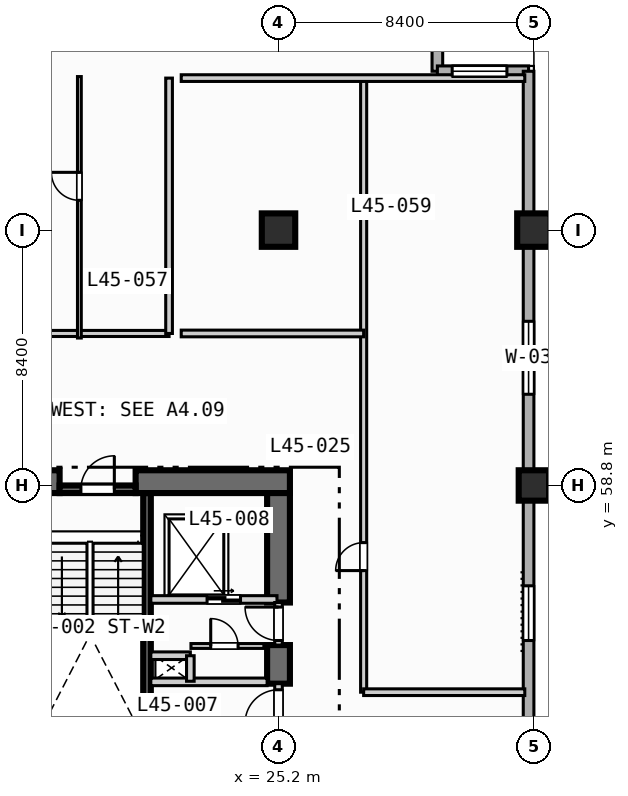
"""IFC4 building model, lengths in metres.
Left out: names, types, materials, properties, quantities, classifications, styles, units other than length and angle.
Written with IfcOpenShell. Run it as: python <this file> out.ifc"""

import sys

from ifc_helpers import new_model, si_unit, direction, frame, frame_2d, origin, origin_2d, place, context, subcontext, project, spatial, rectangle, extrude, element, fill, save


model = new_model("IFC4")
c1 = context("Model", 3, precision=1e-05, world=origin(), true_north=direction((0.0, 1.0)))
c2 = subcontext(c1, "Body", "Model", "MODEL_VIEW")
j1 = project(units=[si_unit("LENGTHUNIT", "METRE"), si_unit("PLANEANGLEUNIT", "RADIAN")], contexts=[c1])
p1 = place(None, origin())
s1 = spatial("IfcSite", under=j1, at=p1, CompositionType="ELEMENT")
p2 = place(p1, origin())
s2 = spatial("IfcBuilding", under=s1, at=p2, CompositionType="ELEMENT")
p3 = place(p2, frame((0.0, 0.0, 186.5)))
s3 = spatial("IfcBuildingStorey", under=s2, at=p3, CompositionType="ELEMENT", Elevation=186.5)
p4 = place(p3, frame((20.875, 50.5, 0.0), z_axis=(0.0, 0.0, 1.0), x_axis=(0.0, 1.0, 0.0)))
e1 = element("IfcWall", 1, at=p4, inside=s3, PredefinedType="SOLIDWALL", context=c2, shape_type="SweptSolid", body=[
    extrude(rectangle(XDim=8.05, YDim=0.25, at=frame_2d((4.025, 0.0))), origin(), (0.0, 0.0, 1.0), 3.47),
])
p5 = place(p3, frame((16.5, 58.925, 0.0), z_axis=(0.0, 0.0, 1.0), x_axis=(1.0, 0.0, 0.0)))
e2 = element("IfcWall", 2, at=p5, inside=s3, PredefinedType="SHEAR", context=c2, shape_type="SweptSolid", body=[
    extrude(rectangle(XDim=1.5, YDim=0.75, at=frame_2d((0.75, 0.0))), origin(), (0.0, 0.0, 1.0), 3.47),
])
p6 = place(p3, frame((20.5, 58.925, 0.0), z_axis=(0.0, 0.0, 1.0), x_axis=(1.0, 0.0, 0.0)))
e3 = element("IfcWall", 3, at=p6, inside=s3, PredefinedType="SHEAR", context=c2, shape_type="SweptSolid", body=[
    extrude(rectangle(XDim=5.075, YDim=0.75, at=frame_2d((2.538, 0.0))), origin(), (0.0, 0.0, 1.0), 3.47),
])
p7 = place(p3, frame((25.2, 52.28, 0.0), z_axis=(0.0, 0.0, 1.0), x_axis=(0.0, 1.0, 0.0)))
e4 = element("IfcWall", 4, at=p7, inside=s3, PredefinedType="SHEAR", context=c2, shape_type="SweptSolid", body=[
    extrude(rectangle(XDim=1.27, YDim=0.75, at=frame_2d((0.635, 0.0))), origin(), (0.0, 0.0, 1.0), 3.47),
])
p8 = place(p3, frame((25.2, 54.95, 0.0), z_axis=(0.0, 0.0, 1.0), x_axis=(0.0, 1.0, 0.0)))
e5 = element("IfcWall", 5, at=p8, inside=s3, PredefinedType="SHEAR", context=c2, shape_type="SweptSolid", body=[
    extrude(rectangle(XDim=3.6, YDim=0.75, at=frame_2d((1.8, 0.0))), origin(), (0.0, 0.0, 1.0), 3.47),
])
p9 = place(p3, frame((25.2, 67.2, 0.0), z_axis=(0.0, 0.0, 1.0), x_axis=(1.0, 0.0, 0.0)))
e6 = element("IfcColumn", 6, at=p9, inside=s3, PredefinedType="COLUMN", context=c2, shape_type="SweptSolid", body=[
    extrude(rectangle(XDim=1.1, YDim=1.1, at=origin_2d()), origin(), (0.0, 0.0, 1.0), 3.7),
])
p10 = place(p3, frame((33.6, 58.8, 0.0), z_axis=(0.0, 0.0, 1.0), x_axis=(1.0, 0.0, 0.0)))
e7 = element("IfcColumn", 7, at=p10, inside=s3, PredefinedType="COLUMN", context=c2, shape_type="SweptSolid", body=[
    extrude(rectangle(XDim=1.0, YDim=1.0, at=origin_2d()), origin(), (0.0, 0.0, 1.0), 3.7),
])
p11 = place(p3, frame((33.6, 67.2, 0.0), z_axis=(0.0, 0.0, 1.0), x_axis=(1.0, 0.0, 0.0)))
e8 = element("IfcColumn", 8, at=p11, inside=s3, PredefinedType="COLUMN", context=c2, shape_type="SweptSolid", body=[
    extrude(rectangle(XDim=1.1, YDim=1.1, at=origin_2d()), origin(), (0.0, 0.0, 1.0), 3.7),
])
p12 = place(p3, frame((30.425, 75.425, 0.0), z_axis=(0.0, 0.0, 1.0), x_axis=(0.0, -1.0, 0.0)))
e9 = element("IfcWall", 9, at=p12, inside=s3, PredefinedType="STANDARD", context=c2, shape_type="SweptSolid", body=[
    extrude(rectangle(XDim=3.0, YDim=0.35, at=frame_2d((1.5, 0.0))), origin(), (0.0, 0.0, 1.0), 3.47),
])
p13 = place(p3, frame((30.425, 72.425, 0.0), z_axis=(0.0, 0.0, 1.0), x_axis=(1.0, 0.0, 0.0)))
e10 = element("IfcWall", 10, at=p13, inside=s3, PredefinedType="STANDARD", context=c2, shape_type="SweptSolid", body=[
    extrude(rectangle(XDim=3.0, YDim=0.35, at=frame_2d((1.5, 0.0))), origin(), (0.0, 0.0, 1.0), 3.47),
])
p14 = place(p13, frame((0.488, 0.0, 0.85)))
e11 = element("IfcOpeningElement", 11, at=p14, cuts=e10, PredefinedType="OPENING", context=c2, shape_type="SweptSolid", body=[
    extrude(rectangle(XDim=1.8, YDim=1.8, at=frame_2d((0.9, 0.9))), frame((0.0, 0.185, 0.0), z_axis=(0.0, -1.0, 0.0), x_axis=(1.0, 0.0, 0.0)), (0.0, 0.0, 1.0), 0.37),
])
p15 = place(p3, frame((33.425, 72.425, 0.0), z_axis=(0.0, 0.0, 1.0), x_axis=(0.0, -1.0, 0.0)))
e12 = element("IfcWall", 12, at=p15, inside=s3, PredefinedType="STANDARD", context=c2, shape_type="SweptSolid", body=[
    extrude(rectangle(XDim=39.0, YDim=0.35, at=frame_2d((19.5, 0.0))), origin(), (0.0, 0.0, 1.0), 3.47),
])
p16 = place(p15, frame((33.725, 0.0, 0.85)))
e13 = element("IfcOpeningElement", 13, at=p16, cuts=e12, PredefinedType="OPENING", context=c2, shape_type="SweptSolid", body=[
    extrude(rectangle(XDim=1.8, YDim=1.8, at=frame_2d((0.9, 0.9))), frame((0.0, 0.185, 0.0), z_axis=(0.0, -1.0, 0.0), x_axis=(1.0, 0.0, 0.0)), (0.0, 0.0, 1.0), 0.37),
])
p17 = place(p15, frame((16.925, 0.0, 0.85)))
e14 = element("IfcOpeningElement", 14, at=p17, cuts=e12, PredefinedType="OPENING", context=c2, shape_type="SweptSolid", body=[
    extrude(rectangle(XDim=1.8, YDim=1.8, at=frame_2d((0.9, 0.9))), frame((0.0, 0.185, 0.0), z_axis=(0.0, -1.0, 0.0), x_axis=(1.0, 0.0, 0.0)), (0.0, 0.0, 1.0), 0.37),
])
p18 = place(p15, frame((8.225, 0.0, 0.85)))
e15 = element("IfcOpeningElement", 15, at=p18, cuts=e12, PredefinedType="OPENING", context=c2, shape_type="SweptSolid", body=[
    extrude(rectangle(XDim=2.4, YDim=1.95, at=frame_2d((1.2, 0.975))), frame((0.0, 0.185, 0.0), z_axis=(0.0, -1.0, 0.0), x_axis=(1.0, 0.0, 0.0)), (0.0, 0.0, 1.0), 0.37),
])
p19 = place(p3, frame((18.0, 58.675, 0.0), z_axis=(0.0, 0.0, 1.0), x_axis=(1.0, 0.0, 0.0)))
e16 = element("IfcWall", 16, at=p19, inside=s3, PredefinedType="SOLIDWALL", context=c2, shape_type="SweptSolid", body=[
    extrude(rectangle(XDim=2.5, YDim=0.25, at=frame_2d((1.25, 0.0))), origin(), (0.0, 0.0, 1.0), 3.47),
])
p20 = place(p19, frame((0.7, 0.0, 0.0)))
e17 = element("IfcOpeningElement", 17, at=p20, cuts=e16, PredefinedType="OPENING", context=c2, shape_type="SweptSolid", body=[
    extrude(rectangle(XDim=1.1, YDim=2.15, at=frame_2d((0.55, 1.075))), frame((0.0, 0.135, 0.0), z_axis=(0.0, -1.0, 0.0), x_axis=(1.0, 0.0, 0.0)), (0.0, 0.0, 1.0), 0.27),
])
p21 = place(p3, frame((25.2, 50.8, 0.0), z_axis=(0.0, 0.0, 1.0), x_axis=(0.0, 1.0, 0.0)))
e18 = element("IfcWall", 18, at=p21, inside=s3, PredefinedType="SOLIDWALL", context=c2, shape_type="SweptSolid", body=[
    extrude(rectangle(XDim=1.48, YDim=0.25, at=frame_2d((0.74, 0.0))), origin(), (0.0, 0.0, 1.0), 3.47),
])
p22 = place(p21, frame((0.18, 0.0, 0.0)))
e19 = element("IfcOpeningElement", 19, at=p22, cuts=e18, PredefinedType="OPENING", context=c2, shape_type="SweptSolid", body=[
    extrude(rectangle(XDim=1.1, YDim=2.15, at=frame_2d((0.55, 1.075))), frame((0.0, 0.135, 0.0), z_axis=(0.0, -1.0, 0.0), x_axis=(1.0, 0.0, 0.0)), (0.0, 0.0, 1.0), 0.27),
])
p23 = place(p3, frame((21.0, 52.34, 0.0), z_axis=(0.0, 0.0, 1.0), x_axis=(1.0, 0.0, 0.0)))
e20 = element("IfcWall", 20, at=p23, inside=s3, PredefinedType="SOLIDWALL", context=c2, shape_type="SweptSolid", body=[
    extrude(rectangle(XDim=3.825, YDim=0.25, at=frame_2d((1.913, 0.0))), origin(), (0.0, 0.0, 1.0), 3.47),
])
p24 = place(p3, frame((21.0, 55.05, 0.0), z_axis=(0.0, 0.0, 1.0), x_axis=(1.0, 0.0, 0.0)))
e21 = element("IfcWall", 21, at=p24, inside=s3, PredefinedType="SOLIDWALL", context=c2, shape_type="SweptSolid", body=[
    extrude(rectangle(XDim=4.15, YDim=0.25, at=frame_2d((2.075, 0.0))), origin(), (0.0, 0.0, 1.0), 3.47),
])
p25 = place(p24, frame((1.85, 0.0, 0.0)))
e22 = element("IfcOpeningElement", 22, at=p25, cuts=e21, PredefinedType="OPENING", context=c2, shape_type="SweptSolid", body=[
    extrude(rectangle(XDim=1.1, YDim=2.15, at=frame_2d((0.55, 1.075))), frame((0.0, 0.135, 0.0), z_axis=(0.0, -1.0, 0.0), x_axis=(1.0, 0.0, 0.0)), (0.0, 0.0, 1.0), 0.27),
])
p26 = place(p3, frame((25.2, 53.55, 0.0), z_axis=(0.0, 0.0, 1.0), x_axis=(0.0, 1.0, 0.0)))
e23 = element("IfcWall", 23, at=p26, inside=s3, PredefinedType="SOLIDWALL", context=c2, shape_type="SweptSolid", body=[
    extrude(rectangle(XDim=1.4, YDim=0.25, at=frame_2d((0.7, 0.0))), origin(), (0.0, 0.0, 1.0), 3.47),
])
p27 = place(p26, frame((0.15, 0.0, 0.0)))
e24 = element("IfcOpeningElement", 24, at=p27, cuts=e23, PredefinedType="OPENING", context=c2, shape_type="SweptSolid", body=[
    extrude(rectangle(XDim=1.1, YDim=2.15, at=frame_2d((0.55, 1.075))), frame((0.0, 0.135, 0.0), z_axis=(0.0, -1.0, 0.0), x_axis=(1.0, 0.0, 0.0)), (0.0, 0.0, 1.0), 0.27),
])
p28 = place(p3, frame((21.0, 53.2, 0.0), z_axis=(0.0, 0.0, 1.0), x_axis=(1.0, 0.0, 0.0)))
e25 = element("IfcWall", 25, at=p28, inside=s3, PredefinedType="SOLIDWALL", context=c2, shape_type="SweptSolid", body=[
    extrude(rectangle(XDim=1.3, YDim=0.25, at=frame_2d((0.65, 0.0))), origin(), (0.0, 0.0, 1.0), 3.47),
])
p29 = place(p3, frame((22.3, 52.36, 0.0), z_axis=(0.0, 0.0, 1.0), x_axis=(0.0, 1.0, 0.0)))
e26 = element("IfcWall", 26, at=p29, inside=s3, PredefinedType="SOLIDWALL", context=c2, shape_type="SweptSolid", body=[
    extrude(rectangle(XDim=0.84, YDim=0.25, at=frame_2d((0.42, 0.0))), origin(), (0.0, 0.0, 1.0), 3.47),
])
p30 = place(p3, frame((22.32, 53.52, 0.0), z_axis=(0.0, 0.0, 1.0), x_axis=(1.0, 0.0, 0.0)))
e27 = element("IfcWall", 27, at=p30, inside=s3, PredefinedType="PARTITIONING", context=c2, shape_type="SweptSolid", body=[
    extrude(rectangle(XDim=2.4, YDim=0.16, at=frame_2d((1.2, 0.0))), origin(), (0.0, 0.0, 1.0), 3.47),
])
p31 = place(p30, frame((0.65, 0.0, 0.0)))
e28 = element("IfcOpeningElement", 28, at=p31, cuts=e27, PredefinedType="OPENING", context=c2, shape_type="SweptSolid", body=[
    extrude(rectangle(XDim=0.9, YDim=2.1, at=frame_2d((0.45, 1.05))), frame((0.0, 0.09, 0.0), z_axis=(0.0, -1.0, 0.0), x_axis=(1.0, 0.0, 0.0)), (0.0, 0.0, 1.0), 0.18),
])
p32 = place(p3, frame((3.4, 63.8, 0.0), z_axis=(0.0, 0.0, 1.0), x_axis=(1.0, 0.0, 0.0)))
e29 = element("IfcWall", 29, at=p32, inside=s3, PredefinedType="PARTITIONING", context=c2, shape_type="SweptSolid", body=[
    extrude(rectangle(XDim=18.2, YDim=0.2, at=frame_2d((9.1, 0.0))), origin(), (0.0, 0.0, 1.0), 3.47),
])
p33 = place(p32, frame((4.05, 0.0, 0.0)))
e30 = element("IfcOpeningElement", 30, at=p33, cuts=e29, PredefinedType="OPENING", context=c2, shape_type="SweptSolid", body=[
    extrude(rectangle(XDim=1.0, YDim=2.15, at=frame_2d((0.5, 1.075))), frame((0.0, 0.11, 0.0), z_axis=(0.0, -1.0, 0.0), x_axis=(1.0, 0.0, 0.0)), (0.0, 0.0, 1.0), 0.22),
])
p34 = place(p3, frame((21.6, 63.8, 0.0), z_axis=(0.0, 0.0, 1.0), x_axis=(0.0, 1.0, 0.0)))
e31 = element("IfcWall", 31, at=p34, inside=s3, PredefinedType="PARTITIONING", context=c2, shape_type="SweptSolid", body=[
    extrude(rectangle(XDim=8.4, YDim=0.22, at=frame_2d((4.2, 0.0))), origin(), (0.0, 0.0, 1.0), 3.47),
])
p35 = place(p3, frame((18.65, 63.65, 0.0), z_axis=(0.0, 0.0, 1.0), x_axis=(0.0, 1.0, 0.0)))
e32 = element("IfcWall", 32, at=p35, inside=s3, PredefinedType="PARTITIONING", context=c2, shape_type="SweptSolid", body=[
    extrude(rectangle(XDim=8.6, YDim=0.125, at=frame_2d((4.3, 0.0))), origin(), (0.0, 0.0, 1.0), 3.47),
])
p36 = place(p35, frame((4.53, 0.0, 0.0)))
e33 = element("IfcOpeningElement", 33, at=p36, cuts=e32, PredefinedType="OPENING", context=c2, shape_type="SweptSolid", body=[
    extrude(rectangle(XDim=0.92, YDim=2.1, at=frame_2d((0.46, 1.05))), frame((0.0, 0.073, 0.0), z_axis=(0.0, -1.0, 0.0), x_axis=(1.0, 0.0, 0.0)), (0.0, 0.0, 1.0), 0.145),
])
p37 = place(p3, frame((28.0, 52.0, 0.0), z_axis=(0.0, 0.0, 1.0), x_axis=(0.0, 1.0, 0.0)))
e34 = element("IfcWall", 34, at=p37, inside=s3, PredefinedType="PARTITIONING", context=c2, shape_type="SweptSolid", body=[
    extrude(rectangle(XDim=20.2, YDim=0.2, at=frame_2d((10.1, 0.0))), origin(), (0.0, 0.0, 1.0), 3.47),
])
p38 = place(p37, frame((4.0, 0.0, 0.0)))
e35 = element("IfcOpeningElement", 35, at=p38, cuts=e34, PredefinedType="OPENING", context=c2, shape_type="SweptSolid", body=[
    extrude(rectangle(XDim=0.92, YDim=2.1, at=frame_2d((0.46, 1.05))), frame((0.0, 0.11, 0.0), z_axis=(0.0, -1.0, 0.0), x_axis=(1.0, 0.0, 0.0)), (0.0, 0.0, 1.0), 0.22),
])
p39 = place(p3, frame((28.0, 52.0, 0.0), z_axis=(0.0, 0.0, 1.0), x_axis=(1.0, 0.0, 0.0)))
e36 = element("IfcWall", 36, at=p39, inside=s3, PredefinedType="PARTITIONING", context=c2, shape_type="SweptSolid", body=[
    extrude(rectangle(XDim=5.3, YDim=0.22, at=frame_2d((2.65, 0.0))), origin(), (0.0, 0.0, 1.0), 3.47),
])
p40 = place(p3, frame((22.0, 72.2, 0.0), z_axis=(0.0, 0.0, 1.0), x_axis=(1.0, 0.0, 0.0)))
e37 = element("IfcWall", 37, at=p40, inside=s3, PredefinedType="PARTITIONING", context=c2, shape_type="SweptSolid", body=[
    extrude(rectangle(XDim=11.3, YDim=0.22, at=frame_2d((5.65, 0.0))), origin(), (0.0, 0.0, 1.0), 3.47),
])
p41 = place(p3, frame((22.0, 63.8, 0.0), z_axis=(0.0, 0.0, 1.0), x_axis=(1.0, 0.0, 0.0)))
e38 = element("IfcWall", 38, at=p41, inside=s3, PredefinedType="PARTITIONING", context=c2, shape_type="SweptSolid", body=[
    extrude(rectangle(XDim=6.0, YDim=0.22, at=frame_2d((3.0, 0.0))), origin(), (0.0, 0.0, 1.0), 3.47),
])
p42 = place(p14, origin())
e39 = element("IfcWindow", 39, at=p42, inside=s3, PartitioningType="SINGLE_PANEL", PredefinedType="WINDOW", context=c2, shape_type="SweptSolid", body=[
    extrude(rectangle(XDim=1.8, YDim=1.8, at=frame_2d((0.9, 0.9))), frame((0.0, 0.03, 0.0), z_axis=(0.0, -1.0, 0.0), x_axis=(1.0, 0.0, 0.0)), (0.0, 0.0, 1.0), 0.06),
])
fill(e11, e39)
p43 = place(p17, origin())
e40 = element("IfcWindow", 40, at=p43, inside=s3, PartitioningType="SINGLE_PANEL", PredefinedType="WINDOW", context=c2, shape_type="SweptSolid", body=[
    extrude(rectangle(XDim=1.8, YDim=1.8, at=frame_2d((0.9, 0.9))), frame((0.0, 0.03, 0.0), z_axis=(0.0, -1.0, 0.0), x_axis=(1.0, 0.0, 0.0)), (0.0, 0.0, 1.0), 0.06),
])
fill(e14, e40)
p44 = place(p18, origin())
e41 = element("IfcWindow", 41, at=p44, inside=s3, PartitioningType="SINGLE_PANEL", PredefinedType="WINDOW", context=c2, shape_type="SweptSolid", body=[
    extrude(rectangle(XDim=2.4, YDim=1.95, at=frame_2d((1.2, 0.975))), frame((0.0, 0.03, 0.0), z_axis=(0.0, -1.0, 0.0), x_axis=(1.0, 0.0, 0.0)), (0.0, 0.0, 1.0), 0.06),
])
fill(e15, e41)
p45 = place(p20, origin())
e42 = element("IfcDoor", 42, at=p45, inside=s3, OperationType="SINGLE_SWING_RIGHT", PredefinedType="DOOR", context=c2, shape_type="SweptSolid", body=[
    extrude(rectangle(XDim=1.1, YDim=2.15, at=frame_2d((0.55, 1.075))), frame((0.0, 0.025, 0.0), z_axis=(0.0, -1.0, 0.0), x_axis=(1.0, 0.0, 0.0)), (0.0, 0.0, 1.0), 0.05),
])
fill(e17, e42)
p46 = place(p22, origin())
e43 = element("IfcDoor", 43, at=p46, inside=s3, OperationType="SINGLE_SWING_LEFT", PredefinedType="DOOR", context=c2, shape_type="SweptSolid", body=[
    extrude(rectangle(XDim=1.1, YDim=2.15, at=frame_2d((0.55, 1.075))), frame((0.0, 0.025, 0.0), z_axis=(0.0, -1.0, 0.0), x_axis=(1.0, 0.0, 0.0)), (0.0, 0.0, 1.0), 0.05),
])
fill(e19, e43)
p47 = place(p25, origin())
e44 = element("IfcDoor", 44, at=p47, inside=s3, OperationType="SLIDING_TO_LEFT", PredefinedType="DOOR", context=c2, shape_type="SweptSolid", body=[
    extrude(rectangle(XDim=1.1, YDim=2.15, at=frame_2d((0.55, 1.075))), frame((0.0, 0.025, 0.0), z_axis=(0.0, -1.0, 0.0), x_axis=(1.0, 0.0, 0.0)), (0.0, 0.0, 1.0), 0.05),
])
fill(e22, e44)
p48 = place(p27, origin())
e45 = element("IfcDoor", 45, at=p48, inside=s3, OperationType="SINGLE_SWING_RIGHT", PredefinedType="DOOR", context=c2, shape_type="SweptSolid", body=[
    extrude(rectangle(XDim=1.1, YDim=2.15, at=frame_2d((0.55, 1.075))), frame((0.0, 0.025, 0.0), z_axis=(0.0, -1.0, 0.0), x_axis=(1.0, 0.0, 0.0)), (0.0, 0.0, 1.0), 0.05),
])
fill(e24, e45)
p49 = place(p31, origin())
e46 = element("IfcDoor", 46, at=p49, inside=s3, OperationType="SINGLE_SWING_LEFT", PredefinedType="DOOR", context=c2, shape_type="SweptSolid", body=[
    extrude(rectangle(XDim=0.9, YDim=2.1, at=frame_2d((0.45, 1.05))), frame((0.0, 0.025, 0.0), z_axis=(0.0, -1.0, 0.0), x_axis=(1.0, 0.0, 0.0)), (0.0, 0.0, 1.0), 0.05),
])
fill(e28, e46)
p50 = place(p36, origin())
e47 = element("IfcDoor", 47, at=p50, inside=s3, OperationType="SINGLE_SWING_RIGHT", PredefinedType="DOOR", context=c2, shape_type="SweptSolid", body=[
    extrude(rectangle(XDim=0.92, YDim=2.1, at=frame_2d((0.46, 1.05))), frame((0.0, 0.025, 0.0), z_axis=(0.0, -1.0, 0.0), x_axis=(1.0, 0.0, 0.0)), (0.0, 0.0, 1.0), 0.05),
])
fill(e33, e47)
p51 = place(p38, origin())
e48 = element("IfcDoor", 48, at=p51, inside=s3, OperationType="SINGLE_SWING_LEFT", PredefinedType="DOOR", context=c2, shape_type="SweptSolid", body=[
    extrude(rectangle(XDim=0.92, YDim=2.1, at=frame_2d((0.46, 1.05))), frame((0.0, 0.025, 0.0), z_axis=(0.0, -1.0, 0.0), x_axis=(1.0, 0.0, 0.0)), (0.0, 0.0, 1.0), 0.05),
])
fill(e35, e48)
save(model, sys.argv[1])
